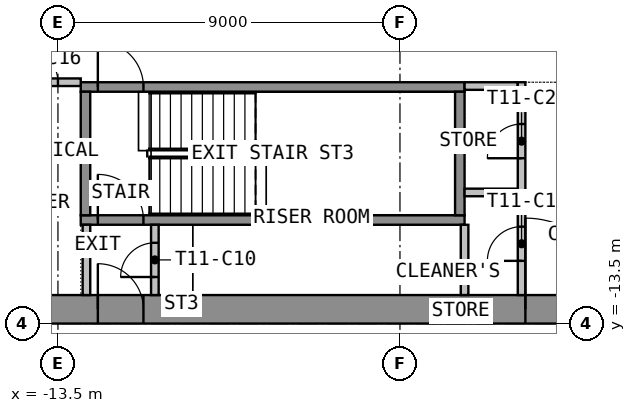
"""IFC4 building model, lengths in metres.
Left out: names, types, materials, properties, quantities, classifications, styles, units other than length and angle.
Written with IfcOpenShell. Run it as: python <this file> out.ifc"""

import sys

from ifc_helpers import new_model, si_unit, direction, frame, frame_2d, origin, place, context, subcontext, project, spatial, rectangle, extrude, element, fill, save


model = new_model("IFC4")
c1 = context("Model", 3, precision=1e-05, world=origin(), true_north=direction((0.0, 1.0)))
c2 = subcontext(c1, "Body", "Model", "MODEL_VIEW")
j1 = project(units=[si_unit("LENGTHUNIT", "METRE"), si_unit("PLANEANGLEUNIT", "RADIAN")], contexts=[c1])
p1 = place(None, origin())
s1 = spatial("IfcSite", under=j1, at=p1, CompositionType="ELEMENT")
p2 = place(p1, origin())
s2 = spatial("IfcBuilding", under=s1, at=p2, CompositionType="ELEMENT")
p3 = place(p2, frame((0.0, 0.0, 156.0)))
s3 = spatial("IfcBuildingStorey", under=s2, at=p3, CompositionType="ELEMENT", Elevation=156.0)
p4 = place(p3, frame((-15.75, -13.125, 0.0), z_axis=(0.0, 0.0, 1.0), x_axis=(1.0, 0.0, 0.0)))
e1 = element("IfcWall", 1, at=p4, inside=s3, PredefinedType="SHEAR", context=c2, shape_type="SweptSolid", body=[
    extrude(rectangle(XDim=31.5, YDim=0.75, at=frame_2d((15.75, 0.0))), origin(), (0.0, 0.0, 1.0), 3.575),
])
p5 = place(p4, frame((14.55, 0.0, 0.0)))
e2 = element("IfcOpeningElement", 2, at=p5, cuts=e1, PredefinedType="OPENING", context=c2, shape_type="SweptSolid", body=[
    extrude(rectangle(XDim=2.4, YDim=2.1, at=frame_2d((1.2, 1.05))), frame((0.0, 0.385, 0.0), z_axis=(0.0, -1.0, 0.0), x_axis=(1.0, 0.0, 0.0)), (0.0, 0.0, 1.0), 0.77),
])
p6 = place(p4, frame((3.3, 0.0, 0.0)))
e3 = element("IfcOpeningElement", 3, at=p6, cuts=e1, PredefinedType="OPENING", context=c2, shape_type="SweptSolid", body=[
    extrude(rectangle(XDim=1.2, YDim=2.1, at=frame_2d((0.6, 1.05))), frame((0.0, 0.385, 0.0), z_axis=(0.0, -1.0, 0.0), x_axis=(1.0, 0.0, 0.0)), (0.0, 0.0, 1.0), 0.77),
])
p7 = place(p4, frame((27.0, 0.0, 0.0)))
e4 = element("IfcOpeningElement", 4, at=p7, cuts=e1, PredefinedType="OPENING", context=c2, shape_type="SweptSolid", body=[
    extrude(rectangle(XDim=1.2, YDim=2.1, at=frame_2d((0.6, 1.05))), frame((0.0, 0.385, 0.0), z_axis=(0.0, -1.0, 0.0), x_axis=(1.0, 0.0, 0.0)), (0.0, 0.0, 1.0), 0.77),
])
p8 = place(p3, frame((-12.9, -10.775, 0.0), z_axis=(0.0, 0.0, 1.0), x_axis=(1.0, 0.0, 0.0)))
e5 = element("IfcWall", 5, at=p8, inside=s3, PredefinedType="SHEAR", context=c2, shape_type="SweptSolid", body=[
    extrude(rectangle(XDim=10.1, YDim=0.25, at=frame_2d((5.05, 0.0))), origin(), (0.0, 0.0, 1.0), 3.575),
])
p9 = place(p8, frame((0.45, 0.0, 0.0)))
e6 = element("IfcOpeningElement", 6, at=p9, cuts=e5, PredefinedType="OPENING", context=c2, shape_type="SweptSolid", body=[
    extrude(rectangle(XDim=1.2, YDim=2.1, at=frame_2d((0.6, 1.05))), frame((0.0, 0.135, 0.0), z_axis=(0.0, -1.0, 0.0), x_axis=(1.0, 0.0, 0.0)), (0.0, 0.0, 1.0), 0.27),
])
p10 = place(p3, frame((-12.9, -7.275, 0.0), z_axis=(0.0, 0.0, 1.0), x_axis=(1.0, 0.0, 0.0)))
e7 = element("IfcWall", 7, at=p10, inside=s3, PredefinedType="SHEAR", context=c2, shape_type="SweptSolid", body=[
    extrude(rectangle(XDim=10.1, YDim=0.25, at=frame_2d((5.05, 0.0))), origin(), (0.0, 0.0, 1.0), 3.575),
])
p11 = place(p10, frame((0.45, 0.0, 0.0)))
e8 = element("IfcOpeningElement", 8, at=p11, cuts=e7, PredefinedType="OPENING", context=c2, shape_type="SweptSolid", body=[
    extrude(rectangle(XDim=1.2, YDim=2.1, at=frame_2d((0.6, 1.05))), frame((0.0, 0.135, 0.0), z_axis=(0.0, -1.0, 0.0), x_axis=(1.0, 0.0, 0.0)), (0.0, 0.0, 1.0), 0.27),
])
for number, where, z_axis, x_axis in (
    (9, (-12.775, -10.65, 0.0), (0.0, 0.0, 1.0), (0.0, 1.0, 0.0)),
    (10, (-2.925, -10.65, 0.0), (0.0, 0.0, 1.0), (0.0, 1.0, 0.0)),
):
    element("IfcWall", number, at=place(p3, frame(where, z_axis=z_axis, x_axis=x_axis)), inside=s3, PredefinedType="SHEAR", context=c2, shape_type="SweptSolid", body=[
        extrude(rectangle(XDim=3.25, YDim=0.25, at=frame_2d((1.625, 0.0))), origin(), (0.0, 0.0, 1.0), 3.575),
    ])
for number, where, z_axis, x_axis in (
    (11, (-2.8, -7.25, 0.0), (0.0, 0.0, 1.0), (1.0, 0.0, 0.0)),
    (12, (-2.8, -10.05, 0.0), (0.0, 0.0, 1.0), (1.0, 0.0, 0.0)),
):
    element("IfcWall", number, at=place(p3, frame(where, z_axis=z_axis, x_axis=x_axis)), inside=s3, PredefinedType="PARTITIONING", context=c2, shape_type="SweptSolid", body=[
        extrude(rectangle(XDim=1.4, YDim=0.2, at=frame_2d((0.7, 0.0))), origin(), (0.0, 0.0, 1.0), 3.575),
    ])
p12 = place(p3, frame((-1.3, -12.75, 0.0), z_axis=(0.0, 0.0, 1.0), x_axis=(0.0, 1.0, 0.0)))
e13 = element("IfcWall", 13, at=p12, inside=s3, PredefinedType="PARTITIONING", context=c2, shape_type="SweptSolid", body=[
    extrude(rectangle(XDim=5.6, YDim=0.2, at=frame_2d((2.8, 0.0))), origin(), (0.0, 0.0, 1.0), 3.575),
])
p13 = place(p12, frame((0.9, 0.0, 0.0)))
e14 = element("IfcOpeningElement", 14, at=p13, cuts=e13, PredefinedType="OPENING", context=c2, shape_type="SweptSolid", body=[
    extrude(rectangle(XDim=0.9, YDim=2.1, at=frame_2d((0.45, 1.05))), frame((0.0, 0.11, 0.0), z_axis=(0.0, -1.0, 0.0), x_axis=(1.0, 0.0, 0.0)), (0.0, 0.0, 1.0), 0.22),
])
p14 = place(p12, frame((3.6, 0.0, 0.0)))
e15 = element("IfcOpeningElement", 15, at=p14, cuts=e13, PredefinedType="OPENING", context=c2, shape_type="SweptSolid", body=[
    extrude(rectangle(XDim=0.9, YDim=2.1, at=frame_2d((0.45, 1.05))), frame((0.0, 0.11, 0.0), z_axis=(0.0, -1.0, 0.0), x_axis=(1.0, 0.0, 0.0)), (0.0, 0.0, 1.0), 0.22),
])
p15 = place(p3, frame((-12.75, -12.75, 0.0), z_axis=(0.0, 0.0, 1.0), x_axis=(0.0, 1.0, 0.0)))
e16 = element("IfcWall", 16, at=p15, inside=s3, PredefinedType="PARTITIONING", context=c2, shape_type="SweptSolid", body=[
    extrude(rectangle(XDim=1.85, YDim=0.2, at=frame_2d((0.925, 0.0))), origin(), (0.0, 0.0, 1.0), 3.575),
])
p16 = place(p3, frame((-10.95, -12.75, 0.0), z_axis=(0.0, 0.0, 1.0), x_axis=(0.0, 1.0, 0.0)))
e17 = element("IfcWall", 17, at=p16, inside=s3, PredefinedType="PARTITIONING", context=c2, shape_type="SweptSolid", body=[
    extrude(rectangle(XDim=1.85, YDim=0.2, at=frame_2d((0.925, 0.0))), origin(), (0.0, 0.0, 1.0), 3.575),
])
p17 = place(p16, frame((0.475, 0.0, 0.0)))
e18 = element("IfcOpeningElement", 18, at=p17, cuts=e17, PredefinedType="OPENING", context=c2, shape_type="SweptSolid", body=[
    extrude(rectangle(XDim=0.9, YDim=2.1, at=frame_2d((0.45, 1.05))), frame((0.0, 0.11, 0.0), z_axis=(0.0, -1.0, 0.0), x_axis=(1.0, 0.0, 0.0)), (0.0, 0.0, 1.0), 0.22),
])
p18 = place(p3, frame((-15.0, -7.15, 0.0), z_axis=(0.0, 0.0, 1.0), x_axis=(1.0, 0.0, 0.0)))
e19 = element("IfcWall", 19, at=p18, inside=s3, PredefinedType="PARTITIONING", context=c2, shape_type="SweptSolid", body=[
    extrude(rectangle(XDim=2.1, YDim=0.2, at=frame_2d((1.05, 0.0))), origin(), (0.0, 0.0, 1.0), 3.575),
])
p19 = place(p18, frame((0.6, 0.0, 0.0)))
e20 = element("IfcOpeningElement", 20, at=p19, cuts=e19, PredefinedType="OPENING", context=c2, shape_type="SweptSolid", body=[
    extrude(rectangle(XDim=0.9, YDim=2.1, at=frame_2d((0.45, 1.05))), frame((0.0, 0.11, 0.0), z_axis=(0.0, -1.0, 0.0), x_axis=(1.0, 0.0, 0.0)), (0.0, 0.0, 1.0), 0.22),
])
p20 = place(p3, frame((-2.8, -12.749, 0.0), z_axis=(0.0, 0.0, 1.0), x_axis=(0.0, 1.0, 0.0)))
e21 = element("IfcWall", 21, at=p20, inside=s3, PredefinedType="PARTITIONING", context=c2, shape_type="SweptSolid", body=[
    extrude(rectangle(XDim=1.848, YDim=0.2, at=frame_2d((0.924, 0.0))), origin(), (0.0, 0.0, 1.0), 3.575),
])
p21 = place(p5, origin())
e22 = element("IfcDoor", 22, at=p21, inside=s3, OperationType="DOUBLE_DOOR_DOUBLE_SWING", PredefinedType="DOOR", context=c2, shape_type="SweptSolid", body=[
    extrude(rectangle(XDim=2.4, YDim=2.1, at=frame_2d((1.2, 1.05))), frame((0.0, 0.025, 0.0), z_axis=(0.0, -1.0, 0.0), x_axis=(1.0, 0.0, 0.0)), (0.0, 0.0, 1.0), 0.05),
])
fill(e2, e22)
p22 = place(p6, origin())
e23 = element("IfcDoor", 23, at=p22, inside=s3, OperationType="SINGLE_SWING_RIGHT", PredefinedType="DOOR", context=c2, shape_type="SweptSolid", body=[
    extrude(rectangle(XDim=1.2, YDim=2.1, at=frame_2d((0.6, 1.05))), frame((0.0, 0.025, 0.0), z_axis=(0.0, -1.0, 0.0), x_axis=(1.0, 0.0, 0.0)), (0.0, 0.0, 1.0), 0.05),
])
fill(e3, e23)
p23 = place(p11, origin())
e24 = element("IfcDoor", 24, at=p23, inside=s3, OperationType="SINGLE_SWING_LEFT", PredefinedType="DOOR", context=c2, shape_type="SweptSolid", body=[
    extrude(rectangle(XDim=1.2, YDim=2.1, at=frame_2d((0.6, 1.05))), frame((0.0, 0.025, 0.0), z_axis=(0.0, -1.0, 0.0), x_axis=(1.0, 0.0, 0.0)), (0.0, 0.0, 1.0), 0.05),
])
fill(e8, e24)
p24 = place(p13, origin())
e25 = element("IfcDoor", 25, at=p24, inside=s3, OperationType="SINGLE_SWING_LEFT", PredefinedType="DOOR", context=c2, shape_type="SweptSolid", body=[
    extrude(rectangle(XDim=0.9, YDim=2.1, at=frame_2d((0.45, 1.05))), frame((0.0, 0.025, 0.0), z_axis=(0.0, -1.0, 0.0), x_axis=(1.0, 0.0, 0.0)), (0.0, 0.0, 1.0), 0.05),
])
fill(e14, e25)
p25 = place(p14, origin())
e26 = element("IfcDoor", 26, at=p25, inside=s3, OperationType="SINGLE_SWING_LEFT", PredefinedType="DOOR", context=c2, shape_type="SweptSolid", body=[
    extrude(rectangle(XDim=0.9, YDim=2.1, at=frame_2d((0.45, 1.05))), frame((0.0, 0.025, 0.0), z_axis=(0.0, -1.0, 0.0), x_axis=(1.0, 0.0, 0.0)), (0.0, 0.0, 1.0), 0.05),
])
fill(e15, e26)
p26 = place(p9, origin())
e27 = element("IfcDoor", 27, at=p26, inside=s3, OperationType="SINGLE_SWING_RIGHT", PredefinedType="DOOR", context=c2, shape_type="SweptSolid", body=[
    extrude(rectangle(XDim=1.2, YDim=2.1, at=frame_2d((0.6, 1.05))), frame((0.0, 0.025, 0.0), z_axis=(0.0, -1.0, 0.0), x_axis=(1.0, 0.0, 0.0)), (0.0, 0.0, 1.0), 0.05),
])
fill(e6, e27)
p27 = place(p17, origin())
e28 = element("IfcDoor", 28, at=p27, inside=s3, OperationType="SINGLE_SWING_LEFT", PredefinedType="DOOR", context=c2, shape_type="SweptSolid", body=[
    extrude(rectangle(XDim=0.9, YDim=2.1, at=frame_2d((0.45, 1.05))), frame((0.0, 0.025, 0.0), z_axis=(0.0, -1.0, 0.0), x_axis=(1.0, 0.0, 0.0)), (0.0, 0.0, 1.0), 0.05),
])
fill(e18, e28)
p28 = place(p19, origin())
e29 = element("IfcDoor", 29, at=p28, inside=s3, OperationType="SINGLE_SWING_LEFT", PredefinedType="DOOR", context=c2, shape_type="SweptSolid", body=[
    extrude(rectangle(XDim=0.9, YDim=2.1, at=frame_2d((0.45, 1.05))), frame((0.0, 0.025, 0.0), z_axis=(0.0, -1.0, 0.0), x_axis=(1.0, 0.0, 0.0)), (0.0, 0.0, 1.0), 0.05),
])
fill(e20, e29)
save(model, sys.argv[1])
